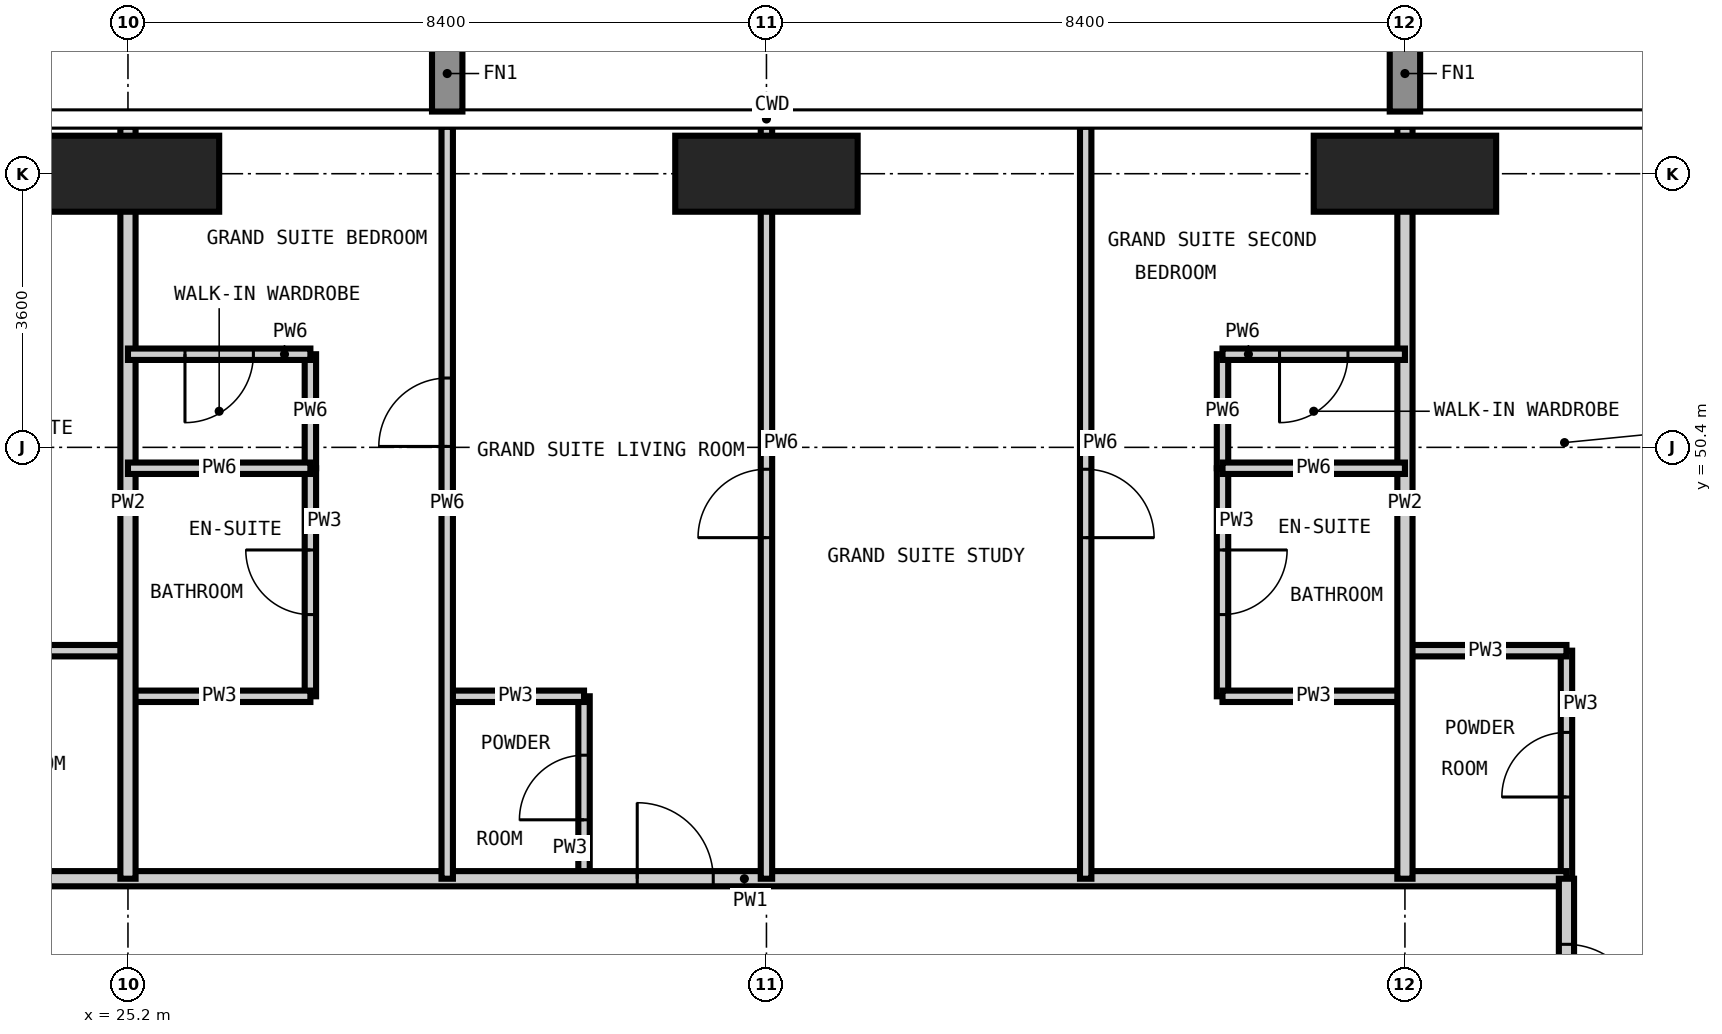
"""IFC4 building model, lengths in metres.
Left out: names, types, materials, properties, quantities, classifications, styles, units other than length and angle.
Written with IfcOpenShell. Run it as: python <this file> out.ifc"""

import sys

from ifc_helpers import new_model, si_unit, direction, frame, frame_2d, origin, origin_2d, place, context, subcontext, project, spatial, rectangle, extrude, element, fill, save


model = new_model("IFC4")
c1 = context("Model", 3, precision=1e-05, world=origin(), true_north=direction((0.0, 1.0)))
c2 = subcontext(c1, "Body", "Model", "MODEL_VIEW")
j1 = project(units=[si_unit("LENGTHUNIT", "METRE"), si_unit("PLANEANGLEUNIT", "RADIAN")], contexts=[c1])
p1 = place(None, origin())
s1 = spatial("IfcSite", under=j1, at=p1, CompositionType="ELEMENT")
p2 = place(p1, origin())
s2 = spatial("IfcBuilding", under=s1, at=p2, CompositionType="ELEMENT")
p3 = place(p2, frame((0.0, 0.0, 276.3)))
s3 = spatial("IfcBuildingStorey", under=s2, at=p3, CompositionType="ELEMENT", Elevation=276.3)
for number, where, z_axis, x_axis in (
    (1, (25.2, 54.0, -0.35), (0.0, 0.0, 1.0), (1.0, 0.0, 0.0)),
    (2, (33.6, 54.0, -0.35), (0.0, 0.0, 1.0), (1.0, 0.0, 0.0)),
    (3, (42.0, 54.0, -0.35), (0.0, 0.0, 1.0), (1.0, 0.0, 0.0)),
):
    element("IfcColumn", number, at=place(p3, frame(where, z_axis=z_axis, x_axis=x_axis)), inside=s3, PredefinedType="COLUMN", context=c2, shape_type="SweptSolid", body=[
        extrude(rectangle(XDim=2.4, YDim=1.0, at=origin_2d()), origin(), (0.0, 0.0, 1.0), 3.9),
    ])
p4 = place(p3, frame((27.6, 47.125, 0.0), z_axis=(0.0, 0.0, 1.0), x_axis=(0.0, 1.0, 0.0)))
e4 = element("IfcWall", 4, at=p4, inside=s3, PredefinedType="PARTITIONING", context=c2, shape_type="SweptSolid", body=[
    extrude(rectangle(XDim=3.0, YDim=0.15, at=frame_2d((1.5, 0.0))), origin(), (0.0, 0.0, 1.0), 3.55),
])
p5 = place(p4, frame((1.075, 0.0, 0.0)))
e5 = element("IfcOpeningElement", 5, at=p5, cuts=e4, PredefinedType="OPENING", context=c2, shape_type="SweptSolid", body=[
    extrude(rectangle(XDim=0.85, YDim=2.1, at=frame_2d((0.425, 1.05))), frame((0.0, 0.085, 0.0), z_axis=(0.0, -1.0, 0.0), x_axis=(1.0, 0.0, 0.0)), (0.0, 0.0, 1.0), 0.17),
])
p6 = place(p3, frame((31.2, 44.725, 0.0), z_axis=(0.0, 0.0, 1.0), x_axis=(0.0, 1.0, 0.0)))
e6 = element("IfcWall", 6, at=p6, inside=s3, PredefinedType="PARTITIONING", context=c2, shape_type="SweptSolid", body=[
    extrude(rectangle(XDim=2.4, YDim=0.15, at=frame_2d((1.2, 0.0))), origin(), (0.0, 0.0, 1.0), 3.55),
])
p7 = place(p6, frame((0.775, 0.0, 0.0)))
e7 = element("IfcOpeningElement", 7, at=p7, cuts=e6, PredefinedType="OPENING", context=c2, shape_type="SweptSolid", body=[
    extrude(rectangle(XDim=0.85, YDim=2.1, at=frame_2d((0.425, 1.05))), frame((0.0, 0.085, 0.0), z_axis=(0.0, -1.0, 0.0), x_axis=(1.0, 0.0, 0.0)), (0.0, 0.0, 1.0), 0.17),
])
p8 = place(p3, frame((39.6, 47.125, 0.0), z_axis=(0.0, 0.0, 1.0), x_axis=(0.0, 1.0, 0.0)))
e8 = element("IfcWall", 8, at=p8, inside=s3, PredefinedType="PARTITIONING", context=c2, shape_type="SweptSolid", body=[
    extrude(rectangle(XDim=3.0, YDim=0.15, at=frame_2d((1.5, 0.0))), origin(), (0.0, 0.0, 1.0), 3.55),
])
p9 = place(p8, frame((1.075, 0.0, 0.0)))
e9 = element("IfcOpeningElement", 9, at=p9, cuts=e8, PredefinedType="OPENING", context=c2, shape_type="SweptSolid", body=[
    extrude(rectangle(XDim=0.85, YDim=2.1, at=frame_2d((0.425, 1.05))), frame((0.0, 0.085, 0.0), z_axis=(0.0, -1.0, 0.0), x_axis=(1.0, 0.0, 0.0)), (0.0, 0.0, 1.0), 0.17),
])
p10 = place(p3, frame((44.125, 44.725, 0.0), z_axis=(0.0, 0.0, 1.0), x_axis=(0.0, 1.0, 0.0)))
e10 = element("IfcWall", 10, at=p10, inside=s3, PredefinedType="PARTITIONING", context=c2, shape_type="SweptSolid", body=[
    extrude(rectangle(XDim=3.0, YDim=0.15, at=frame_2d((1.5, 0.0))), origin(), (0.0, 0.0, 1.0), 3.55),
])
p11 = place(p10, frame((1.075, 0.0, 0.0)))
e11 = element("IfcOpeningElement", 11, at=p11, cuts=e10, PredefinedType="OPENING", context=c2, shape_type="SweptSolid", body=[
    extrude(rectangle(XDim=0.85, YDim=2.1, at=frame_2d((0.425, 1.05))), frame((0.0, 0.085, 0.0), z_axis=(0.0, -1.0, 0.0), x_axis=(1.0, 0.0, 0.0)), (0.0, 0.0, 1.0), 0.17),
])
p12 = place(p3, frame((25.2, 47.125, 0.0), z_axis=(0.0, 0.0, 1.0), x_axis=(1.0, 0.0, 0.0)))
e12 = element("IfcWall", 12, at=p12, inside=s3, PredefinedType="PARTITIONING", context=c2, shape_type="SweptSolid", body=[
    extrude(rectangle(XDim=2.4, YDim=0.15, at=frame_2d((1.2, 0.0))), origin(), (0.0, 0.0, 1.0), 3.55),
])
p13 = place(p3, frame((29.4, 47.125, 0.0), z_axis=(0.0, 0.0, 1.0), x_axis=(1.0, 0.0, 0.0)))
e13 = element("IfcWall", 13, at=p13, inside=s3, PredefinedType="PARTITIONING", context=c2, shape_type="SweptSolid", body=[
    extrude(rectangle(XDim=1.8, YDim=0.15, at=frame_2d((0.9, 0.0))), origin(), (0.0, 0.0, 1.0), 3.55),
])
p14 = place(p3, frame((39.6, 47.125, 0.0), z_axis=(0.0, 0.0, 1.0), x_axis=(1.0, 0.0, 0.0)))
e14 = element("IfcWall", 14, at=p14, inside=s3, PredefinedType="PARTITIONING", context=c2, shape_type="SweptSolid", body=[
    extrude(rectangle(XDim=2.4, YDim=0.15, at=frame_2d((1.2, 0.0))), origin(), (0.0, 0.0, 1.0), 3.55),
])
p15 = place(p3, frame((21.875, 47.725, 0.0), z_axis=(0.0, 0.0, 1.0), x_axis=(1.0, 0.0, 0.0)))
e15 = element("IfcWall", 15, at=p15, inside=s3, PredefinedType="PARTITIONING", context=c2, shape_type="SweptSolid", body=[
    extrude(rectangle(XDim=3.325, YDim=0.15, at=frame_2d((1.663, 0.0))), origin(), (0.0, 0.0, 1.0), 3.55),
])
p16 = place(p15, frame((1.238, 0.0, 0.0)))
e16 = element("IfcOpeningElement", 16, at=p16, cuts=e15, PredefinedType="OPENING", context=c2, shape_type="SweptSolid", body=[
    extrude(rectangle(XDim=0.85, YDim=2.1, at=frame_2d((0.425, 1.05))), frame((0.0, 0.085, 0.0), z_axis=(0.0, -1.0, 0.0), x_axis=(1.0, 0.0, 0.0)), (0.0, 0.0, 1.0), 0.17),
])
p17 = place(p3, frame((42.0, 47.725, 0.0), z_axis=(0.0, 0.0, 1.0), x_axis=(1.0, 0.0, 0.0)))
e17 = element("IfcWall", 17, at=p17, inside=s3, PredefinedType="PARTITIONING", context=c2, shape_type="SweptSolid", body=[
    extrude(rectangle(XDim=2.125, YDim=0.15, at=frame_2d((1.062, 0.0))), origin(), (0.0, 0.0, 1.0), 3.55),
])
p18 = place(p3, frame((21.875, 44.725, 0.0), z_axis=(0.0, 0.0, 1.0), x_axis=(1.0, 0.0, 0.0)))
e18 = element("IfcWall", 18, at=p18, inside=s3, PredefinedType="PARTITIONING", context=c2, shape_type="SweptSolid", body=[
    extrude(rectangle(XDim=22.25, YDim=0.2, at=frame_2d((11.125, 0.0))), origin(), (0.0, 0.0, 1.0), 3.55),
])
p19 = place(p18, frame((10.025, 0.0, 0.0)))
e19 = element("IfcOpeningElement", 19, at=p19, cuts=e18, PredefinedType="OPENING", context=c2, shape_type="SweptSolid", body=[
    extrude(rectangle(XDim=1.0, YDim=2.2, at=frame_2d((0.5, 1.1))), frame((0.0, 0.11, 0.0), z_axis=(0.0, -1.0, 0.0), x_axis=(1.0, 0.0, 0.0)), (0.0, 0.0, 1.0), 0.22),
])
p20 = place(p3, frame((44.125, 44.725, 0.0), z_axis=(0.0, 0.0, 1.0), x_axis=(0.0, -1.0, 0.0)))
e20 = element("IfcWall", 20, at=p20, inside=s3, PredefinedType="PARTITIONING", context=c2, shape_type="SweptSolid", body=[
    extrude(rectangle(XDim=15.325, YDim=0.2, at=frame_2d((7.663, 0.0))), origin(), (0.0, 0.0, 1.0), 3.55),
])
p21 = place(p20, frame((8.525, 0.0, 0.0)))
e21 = element("IfcOpeningElement", 21, at=p21, cuts=e20, PredefinedType="OPENING", context=c2, shape_type="SweptSolid", body=[
    extrude(rectangle(XDim=1.0, YDim=2.2, at=frame_2d((0.5, 1.1))), frame((0.0, 0.11, 0.0), z_axis=(0.0, -1.0, 0.0), x_axis=(1.0, 0.0, 0.0)), (0.0, 0.0, 1.0), 0.22),
])
p22 = place(p20, frame((0.863, 0.0, 0.0)))
e22 = element("IfcOpeningElement", 22, at=p22, cuts=e20, PredefinedType="OPENING", context=c2, shape_type="SweptSolid", body=[
    extrude(rectangle(XDim=1.0, YDim=2.2, at=frame_2d((0.5, 1.1))), frame((0.0, 0.11, 0.0), z_axis=(0.0, -1.0, 0.0), x_axis=(1.0, 0.0, 0.0)), (0.0, 0.0, 1.0), 0.22),
])
for number, where, z_axis, x_axis in (
    (23, (25.2, 44.725, 0.0), (0.0, 0.0, 1.0), (0.0, 1.0, 0.0)),
    (24, (42.0, 44.725, 0.0), (0.0, 0.0, 1.0), (0.0, 1.0, 0.0)),
):
    element("IfcWall", number, at=place(p3, frame(where, z_axis=z_axis, x_axis=x_axis)), inside=s3, PredefinedType="PARTITIONING", context=c2, shape_type="SweptSolid", body=[
        extrude(rectangle(XDim=9.893, YDim=0.2, at=frame_2d((4.946, 0.0))), origin(), (0.0, 0.0, 1.0), 3.55),
    ])
p23 = place(p3, frame((27.6, 50.125, 0.0), z_axis=(0.0, 0.0, 1.0), x_axis=(0.0, 1.0, 0.0)))
e25 = element("IfcWall", 25, at=p23, inside=s3, PredefinedType="PARTITIONING", context=c2, shape_type="SweptSolid", body=[
    extrude(rectangle(XDim=1.5, YDim=0.15, at=frame_2d((0.75, 0.0))), origin(), (0.0, 0.0, 1.0), 3.55),
])
p24 = place(p3, frame((29.4, 44.725, 0.0), z_axis=(0.0, 0.0, 1.0), x_axis=(0.0, 1.0, 0.0)))
e26 = element("IfcWall", 26, at=p24, inside=s3, PredefinedType="PARTITIONING", context=c2, shape_type="SweptSolid", body=[
    extrude(rectangle(XDim=9.893, YDim=0.15, at=frame_2d((4.946, 0.0))), origin(), (0.0, 0.0, 1.0), 3.55),
])
p25 = place(p24, frame((5.687, 0.0, 0.0)))
e27 = element("IfcOpeningElement", 27, at=p25, cuts=e26, PredefinedType="OPENING", context=c2, shape_type="SweptSolid", body=[
    extrude(rectangle(XDim=0.9, YDim=2.1, at=frame_2d((0.45, 1.05))), frame((0.0, 0.085, 0.0), z_axis=(0.0, -1.0, 0.0), x_axis=(1.0, 0.0, 0.0)), (0.0, 0.0, 1.0), 0.17),
])
p26 = place(p3, frame((33.6, 44.725, 0.0), z_axis=(0.0, 0.0, 1.0), x_axis=(0.0, 1.0, 0.0)))
e28 = element("IfcWall", 28, at=p26, inside=s3, PredefinedType="PARTITIONING", context=c2, shape_type="SweptSolid", body=[
    extrude(rectangle(XDim=9.893, YDim=0.15, at=frame_2d((4.946, 0.0))), origin(), (0.0, 0.0, 1.0), 3.55),
])
p27 = place(p26, frame((4.487, 0.0, 0.0)))
e29 = element("IfcOpeningElement", 29, at=p27, cuts=e28, PredefinedType="OPENING", context=c2, shape_type="SweptSolid", body=[
    extrude(rectangle(XDim=0.9, YDim=2.1, at=frame_2d((0.45, 1.05))), frame((0.0, 0.085, 0.0), z_axis=(0.0, -1.0, 0.0), x_axis=(1.0, 0.0, 0.0)), (0.0, 0.0, 1.0), 0.17),
])
p28 = place(p3, frame((37.8, 44.725, 0.0), z_axis=(0.0, 0.0, 1.0), x_axis=(0.0, 1.0, 0.0)))
e30 = element("IfcWall", 30, at=p28, inside=s3, PredefinedType="PARTITIONING", context=c2, shape_type="SweptSolid", body=[
    extrude(rectangle(XDim=9.893, YDim=0.15, at=frame_2d((4.946, 0.0))), origin(), (0.0, 0.0, 1.0), 3.55),
])
p29 = place(p28, frame((4.487, 0.0, 0.0)))
e31 = element("IfcOpeningElement", 31, at=p29, cuts=e30, PredefinedType="OPENING", context=c2, shape_type="SweptSolid", body=[
    extrude(rectangle(XDim=0.9, YDim=2.1, at=frame_2d((0.45, 1.05))), frame((0.0, 0.085, 0.0), z_axis=(0.0, -1.0, 0.0), x_axis=(1.0, 0.0, 0.0)), (0.0, 0.0, 1.0), 0.17),
])
p30 = place(p3, frame((39.6, 50.125, 0.0), z_axis=(0.0, 0.0, 1.0), x_axis=(0.0, 1.0, 0.0)))
e32 = element("IfcWall", 32, at=p30, inside=s3, PredefinedType="PARTITIONING", context=c2, shape_type="SweptSolid", body=[
    extrude(rectangle(XDim=1.5, YDim=0.15, at=frame_2d((0.75, 0.0))), origin(), (0.0, 0.0, 1.0), 3.55),
])
p31 = place(p3, frame((25.2, 50.125, 0.0), z_axis=(0.0, 0.0, 1.0), x_axis=(1.0, 0.0, 0.0)))
e33 = element("IfcWall", 33, at=p31, inside=s3, PredefinedType="PARTITIONING", context=c2, shape_type="SweptSolid", body=[
    extrude(rectangle(XDim=2.4, YDim=0.15, at=frame_2d((1.2, 0.0))), origin(), (0.0, 0.0, 1.0), 3.55),
])
p32 = place(p3, frame((39.6, 50.125, 0.0), z_axis=(0.0, 0.0, 1.0), x_axis=(1.0, 0.0, 0.0)))
e34 = element("IfcWall", 34, at=p32, inside=s3, PredefinedType="PARTITIONING", context=c2, shape_type="SweptSolid", body=[
    extrude(rectangle(XDim=2.4, YDim=0.15, at=frame_2d((1.2, 0.0))), origin(), (0.0, 0.0, 1.0), 3.55),
])
p33 = place(p3, frame((25.2, 51.625, 0.0), z_axis=(0.0, 0.0, 1.0), x_axis=(1.0, 0.0, 0.0)))
e35 = element("IfcWall", 35, at=p33, inside=s3, PredefinedType="PARTITIONING", context=c2, shape_type="SweptSolid", body=[
    extrude(rectangle(XDim=2.4, YDim=0.15, at=frame_2d((1.2, 0.0))), origin(), (0.0, 0.0, 1.0), 3.55),
])
p34 = place(p33, frame((0.75, 0.0, 0.0)))
e36 = element("IfcOpeningElement", 36, at=p34, cuts=e35, PredefinedType="OPENING", context=c2, shape_type="SweptSolid", body=[
    extrude(rectangle(XDim=0.9, YDim=2.1, at=frame_2d((0.45, 1.05))), frame((0.0, 0.085, 0.0), z_axis=(0.0, -1.0, 0.0), x_axis=(1.0, 0.0, 0.0)), (0.0, 0.0, 1.0), 0.17),
])
p35 = place(p3, frame((39.6, 51.625, 0.0), z_axis=(0.0, 0.0, 1.0), x_axis=(1.0, 0.0, 0.0)))
e37 = element("IfcWall", 37, at=p35, inside=s3, PredefinedType="PARTITIONING", context=c2, shape_type="SweptSolid", body=[
    extrude(rectangle(XDim=2.4, YDim=0.15, at=frame_2d((1.2, 0.0))), origin(), (0.0, 0.0, 1.0), 3.55),
])
p36 = place(p35, frame((0.75, 0.0, 0.0)))
e38 = element("IfcOpeningElement", 38, at=p36, cuts=e37, PredefinedType="OPENING", context=c2, shape_type="SweptSolid", body=[
    extrude(rectangle(XDim=0.9, YDim=2.1, at=frame_2d((0.45, 1.05))), frame((0.0, 0.085, 0.0), z_axis=(0.0, -1.0, 0.0), x_axis=(1.0, 0.0, 0.0)), (0.0, 0.0, 1.0), 0.17),
])
p37 = place(p19, origin())
e39 = element("IfcDoor", 39, at=p37, inside=s3, OperationType="SINGLE_SWING_LEFT", PredefinedType="DOOR", context=c2, shape_type="SweptSolid", body=[
    extrude(rectangle(XDim=1.0, YDim=2.2, at=frame_2d((0.5, 1.1))), frame((0.0, 0.025, 0.0), z_axis=(0.0, -1.0, 0.0), x_axis=(1.0, 0.0, 0.0)), (0.0, 0.0, 1.0), 0.05),
])
fill(e19, e39)
p38 = place(p7, origin())
e40 = element("IfcDoor", 40, at=p38, inside=s3, OperationType="SINGLE_SWING_LEFT", PredefinedType="DOOR", context=c2, shape_type="SweptSolid", body=[
    extrude(rectangle(XDim=0.85, YDim=2.1, at=frame_2d((0.425, 1.05))), frame((0.0, 0.025, 0.0), z_axis=(0.0, -1.0, 0.0), x_axis=(1.0, 0.0, 0.0)), (0.0, 0.0, 1.0), 0.05),
])
fill(e7, e40)
p39 = place(p25, origin())
e41 = element("IfcDoor", 41, at=p39, inside=s3, OperationType="SINGLE_SWING_LEFT", PredefinedType="DOOR", context=c2, shape_type="SweptSolid", body=[
    extrude(rectangle(XDim=0.9, YDim=2.1, at=frame_2d((0.45, 1.05))), frame((0.0, 0.025, 0.0), z_axis=(0.0, -1.0, 0.0), x_axis=(1.0, 0.0, 0.0)), (0.0, 0.0, 1.0), 0.05),
])
fill(e27, e41)
p40 = place(p5, origin())
e42 = element("IfcDoor", 42, at=p40, inside=s3, OperationType="SINGLE_SWING_RIGHT", PredefinedType="DOOR", context=c2, shape_type="SweptSolid", body=[
    extrude(rectangle(XDim=0.85, YDim=2.1, at=frame_2d((0.425, 1.05))), frame((0.0, 0.025, 0.0), z_axis=(0.0, -1.0, 0.0), x_axis=(1.0, 0.0, 0.0)), (0.0, 0.0, 1.0), 0.05),
])
fill(e5, e42)
p41 = place(p34, frame((0.9, 0.0, 0.0), z_axis=(0.0, 0.0, 1.0), x_axis=(-1.0, 0.0, 0.0)))
e43 = element("IfcDoor", 43, at=p41, inside=s3, OperationType="SINGLE_SWING_RIGHT", PredefinedType="DOOR", context=c2, shape_type="SweptSolid", body=[
    extrude(rectangle(XDim=0.9, YDim=2.1, at=frame_2d((0.45, 1.05))), frame((0.0, 0.025, 0.0), z_axis=(0.0, -1.0, 0.0), x_axis=(1.0, 0.0, 0.0)), (0.0, 0.0, 1.0), 0.05),
])
fill(e36, e43)
p42 = place(p27, origin())
e44 = element("IfcDoor", 44, at=p42, inside=s3, OperationType="SINGLE_SWING_LEFT", PredefinedType="DOOR", context=c2, shape_type="SweptSolid", body=[
    extrude(rectangle(XDim=0.9, YDim=2.1, at=frame_2d((0.45, 1.05))), frame((0.0, 0.025, 0.0), z_axis=(0.0, -1.0, 0.0), x_axis=(1.0, 0.0, 0.0)), (0.0, 0.0, 1.0), 0.05),
])
fill(e29, e44)
p43 = place(p29, frame((0.9, 0.0, 0.0), z_axis=(0.0, 0.0, 1.0), x_axis=(-1.0, 0.0, 0.0)))
e45 = element("IfcDoor", 45, at=p43, inside=s3, OperationType="SINGLE_SWING_RIGHT", PredefinedType="DOOR", context=c2, shape_type="SweptSolid", body=[
    extrude(rectangle(XDim=0.9, YDim=2.1, at=frame_2d((0.45, 1.05))), frame((0.0, 0.025, 0.0), z_axis=(0.0, -1.0, 0.0), x_axis=(1.0, 0.0, 0.0)), (0.0, 0.0, 1.0), 0.05),
])
fill(e31, e45)
p44 = place(p9, frame((0.85, 0.0, 0.0), z_axis=(0.0, 0.0, 1.0), x_axis=(-1.0, 0.0, 0.0)))
e46 = element("IfcDoor", 46, at=p44, inside=s3, OperationType="SINGLE_SWING_LEFT", PredefinedType="DOOR", context=c2, shape_type="SweptSolid", body=[
    extrude(rectangle(XDim=0.85, YDim=2.1, at=frame_2d((0.425, 1.05))), frame((0.0, 0.025, 0.0), z_axis=(0.0, -1.0, 0.0), x_axis=(1.0, 0.0, 0.0)), (0.0, 0.0, 1.0), 0.05),
])
fill(e9, e46)
p45 = place(p36, frame((0.9, 0.0, 0.0), z_axis=(0.0, 0.0, 1.0), x_axis=(-1.0, 0.0, 0.0)))
e47 = element("IfcDoor", 47, at=p45, inside=s3, OperationType="SINGLE_SWING_RIGHT", PredefinedType="DOOR", context=c2, shape_type="SweptSolid", body=[
    extrude(rectangle(XDim=0.9, YDim=2.1, at=frame_2d((0.45, 1.05))), frame((0.0, 0.025, 0.0), z_axis=(0.0, -1.0, 0.0), x_axis=(1.0, 0.0, 0.0)), (0.0, 0.0, 1.0), 0.05),
])
fill(e38, e47)
p46 = place(p22, origin())
e48 = element("IfcDoor", 48, at=p46, inside=s3, OperationType="SINGLE_SWING_RIGHT", PredefinedType="DOOR", context=c2, shape_type="SweptSolid", body=[
    extrude(rectangle(XDim=1.0, YDim=2.2, at=frame_2d((0.5, 1.1))), frame((0.0, 0.025, 0.0), z_axis=(0.0, -1.0, 0.0), x_axis=(1.0, 0.0, 0.0)), (0.0, 0.0, 1.0), 0.05),
])
fill(e22, e48)
p47 = place(p11, origin())
e49 = element("IfcDoor", 49, at=p47, inside=s3, OperationType="SINGLE_SWING_LEFT", PredefinedType="DOOR", context=c2, shape_type="SweptSolid", body=[
    extrude(rectangle(XDim=0.85, YDim=2.1, at=frame_2d((0.425, 1.05))), frame((0.0, 0.025, 0.0), z_axis=(0.0, -1.0, 0.0), x_axis=(1.0, 0.0, 0.0)), (0.0, 0.0, 1.0), 0.05),
])
fill(e11, e49)
save(model, sys.argv[1])
